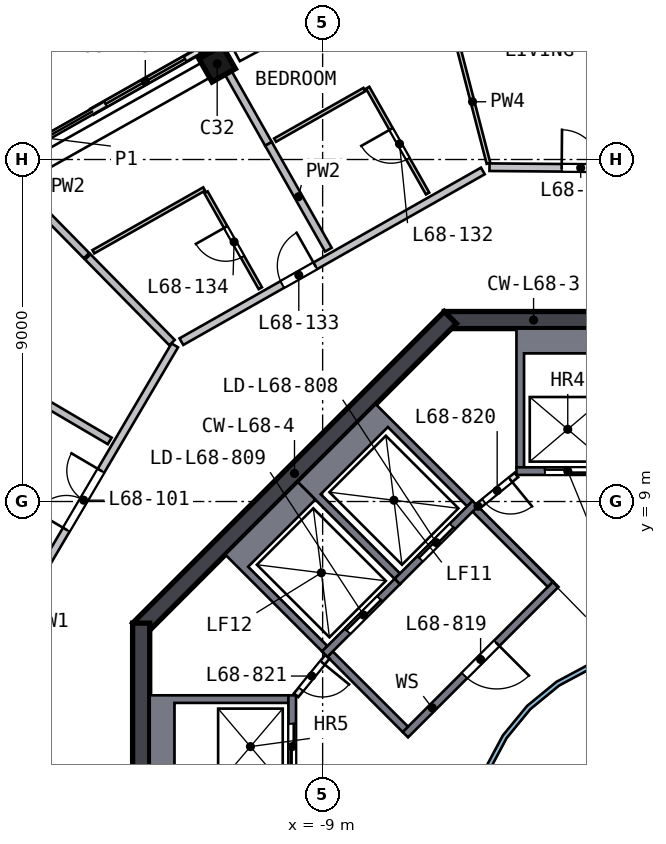
"""IFC4 building model, lengths in metres.
Left out: names, types, materials, properties, quantities, classifications, styles, units other than length and angle.
Written with IfcOpenShell. Run it as: python <this file> out.ifc"""

import sys

from ifc_helpers import new_model, si_unit, direction, frame, frame_2d, origin, origin_2d, place, context, subcontext, project, spatial, polyline, rectangle, outline, extrude, element, fill, save


model = new_model("IFC4")
c1 = context("Model", 3, precision=1e-05, world=origin(), true_north=direction((0.0, 1.0)))
c2 = subcontext(c1, "Body", "Model", "MODEL_VIEW")
j1 = project(units=[si_unit("LENGTHUNIT", "METRE"), si_unit("PLANEANGLEUNIT", "RADIAN")], contexts=[c1])
p1 = place(None, origin())
s1 = spatial("IfcSite", under=j1, at=p1, CompositionType="ELEMENT")
p2 = place(p1, origin())
s2 = spatial("IfcBuilding", under=s1, at=p2, CompositionType="ELEMENT")
p3 = place(p2, frame((0.0, 0.0, 277.5)))
s3 = spatial("IfcBuildingStorey", under=s2, at=p3, CompositionType="ELEMENT", Elevation=277.5)
p4 = place(p3, frame((-11.657, 20.587, 0.0), z_axis=(-0.097493601, -0.056275557, 0.993643829), x_axis=(-0.864752693, -0.4894198, -0.112565713)))
e1 = element("IfcColumn", 1, at=p4, inside=s3, PredefinedType="COLUMN", context=c2, shape_type="SweptSolid", body=[
    extrude(rectangle(XDim=0.7, YDim=0.7, at=origin_2d()), origin(), (0.0, 0.0, 1.0), 3.21),
])
p5 = place(p3, frame((5.799, 13.775, 0.0), z_axis=(0.0, 0.0, 1.0), x_axis=(-1.0, 0.0, 0.0)))
e2 = element("IfcWall", 2, at=p5, inside=s3, PredefinedType="SHEAR", context=c2, shape_type="SweptSolid", body=[
    extrude(rectangle(XDim=11.598, YDim=0.45, at=frame_2d((5.799, 0.0))), origin(), (0.0, 0.0, 1.0), 3.5),
])
p6 = place(p5, frame((4.899, 0.0, 0.0)))
e3 = element("IfcOpeningElement", 3, at=p6, cuts=e2, PredefinedType="OPENING", context=c2, shape_type="SweptSolid", body=[
    extrude(rectangle(XDim=1.8, YDim=2.1, at=frame_2d((0.9, 1.05))), frame((0.0, 0.235, 0.0), z_axis=(0.0, -1.0, 0.0), x_axis=(1.0, 0.0, 0.0)), (0.0, 0.0, 1.0), 0.47),
])
p7 = place(p3, frame((-5.64, 13.841, 0.0), z_axis=(0.0, 0.0, 1.0), x_axis=(-0.707106781, -0.707106781, 0.0)))
e4 = element("IfcWall", 4, at=p7, inside=s3, PredefinedType="SHEAR", context=c2, shape_type="SweptSolid", body=[
    extrude(rectangle(XDim=11.598, YDim=0.45, at=frame_2d((5.799, 0.0))), origin(), (0.0, 0.0, 1.0), 3.5),
])
p8 = place(p3, frame((-13.775, 5.799, 0.0), z_axis=(0.0, 0.0, 1.0), x_axis=(0.0, -1.0, 0.0)))
e5 = element("IfcWall", 5, at=p8, inside=s3, PredefinedType="SHEAR", context=c2, shape_type="SweptSolid", body=[
    extrude(rectangle(XDim=11.598, YDim=0.45, at=frame_2d((5.799, 0.0))), origin(), (0.0, 0.0, 1.0), 3.5),
])
p9 = place(p8, frame((4.899, 0.0, 0.0)))
e6 = element("IfcOpeningElement", 6, at=p9, cuts=e5, PredefinedType="OPENING", context=c2, shape_type="SweptSolid", body=[
    extrude(rectangle(XDim=1.8, YDim=2.1, at=frame_2d((0.9, 1.05))), frame((0.0, 0.235, 0.0), z_axis=(0.0, -1.0, 0.0), x_axis=(1.0, 0.0, 0.0)), (0.0, 0.0, 1.0), 0.47),
])
p10 = place(p3, frame((-11.916, 21.044, 0.0), z_axis=(0.0, 0.0, 1.0), x_axis=(-0.870199981, -0.492698684, 0.0)))
e7 = element("IfcWall", 7, at=p10, inside=s3, PredefinedType="SOLIDWALL", context=c2, shape_type="SweptSolid", body=[
    extrude(rectangle(XDim=3.611, YDim=0.15, at=frame_2d((1.806, 0.0))), origin(), (0.0, 0.0, 1.0), 2.525),
])
p11 = place(p10, frame((0.811, 0.0, 0.0)))
e8 = element("IfcOpeningElement", 8, at=p11, cuts=e7, PredefinedType="OPENING", context=c2, shape_type="SweptSolid", body=[
    extrude(rectangle(XDim=2.4, YDim=2.4, at=frame_2d((1.2, 1.2))), frame((0.0, 0.085, 0.0), z_axis=(0.0, -1.0, 0.0), x_axis=(1.0, 0.0, 0.0)), (0.0, 0.0, 1.0), 0.17),
])
p12 = place(p3, origin())
e9 = element("IfcWall", 9, at=p12, inside=s3, PredefinedType="SOLIDWALL", context=c2, shape_type="SweptSolid", body=[
    extrude(outline(polyline([(-3.9, 13.55), (-1.2, 13.55), (-1.2, 9.9), (-1.4, 9.9), (-1.4, 12.9), (-3.7, 12.9), (-3.7, 9.9), (-3.9, 9.9), (-3.9, 13.55)])), origin(), (0.0, 0.0, 1.0), 3.19),
])
p13 = place(p3, frame((-1.2, 9.8, 0.0), z_axis=(0.0, 0.0, 1.0), x_axis=(-1.0, 0.0, 0.0)))
e10 = element("IfcWall", 10, at=p13, inside=s3, PredefinedType="SOLIDWALL", context=c2, shape_type="SweptSolid", body=[
    extrude(rectangle(XDim=2.7, YDim=0.2, at=frame_2d((1.35, 0.0))), origin(), (0.0, 0.0, 1.0), 3.19),
])
p14 = place(p13, frame((0.75, 0.0, 0.0)))
e11 = element("IfcOpeningElement", 11, at=p14, cuts=e10, PredefinedType="OPENING", context=c2, shape_type="SweptSolid", body=[
    extrude(rectangle(XDim=1.2, YDim=2.1, at=frame_2d((0.6, 1.05))), frame((0.0, 0.11, 0.0), z_axis=(0.0, -1.0, 0.0), x_axis=(1.0, 0.0, 0.0)), (0.0, 0.0, 1.0), 0.22),
])
p15 = place(p3, origin())
e12 = element("IfcWall", 12, at=p15, inside=s3, PredefinedType="SOLIDWALL", context=c2, shape_type="SweptSolid", body=[
    extrude(outline(polyline([(-13.55, 3.9), (-9.9, 3.9), (-9.9, 3.7), (-12.9, 3.7), (-12.9, 1.4), (-9.9, 1.4), (-9.9, 1.2), (-13.55, 1.2), (-13.55, 3.9)])), origin(), (0.0, 0.0, 1.0), 3.19),
])
p16 = place(p3, frame((-9.8, 1.2, 0.0), z_axis=(0.0, 0.0, 1.0), x_axis=(0.0, 1.0, 0.0)))
e13 = element("IfcWall", 13, at=p16, inside=s3, PredefinedType="SOLIDWALL", context=c2, shape_type="SweptSolid", body=[
    extrude(rectangle(XDim=2.7, YDim=0.2, at=frame_2d((1.35, 0.0))), origin(), (0.0, 0.0, 1.0), 3.19),
])
p17 = place(p16, frame((0.75, 0.0, 0.0)))
e14 = element("IfcOpeningElement", 14, at=p17, cuts=e13, PredefinedType="OPENING", context=c2, shape_type="SweptSolid", body=[
    extrude(rectangle(XDim=1.2, YDim=2.1, at=frame_2d((0.6, 1.05))), frame((0.0, 0.11, 0.0), z_axis=(0.0, -1.0, 0.0), x_axis=(1.0, 0.0, 0.0)), (0.0, 0.0, 1.0), 0.22),
])
p18 = place(p3, origin())
e15 = element("IfcWall", 15, at=p18, inside=s3, PredefinedType="SOLIDWALL", context=c2, shape_type="SweptSolid", body=[
    extrude(outline(polyline([(-9.652, 9.51), (-7.601, 11.561), (-5.056, 9.016), (-5.197, 8.874), (-7.283, 10.96), (-9.051, 9.192), (-6.965, 7.106), (-7.106, 6.965), (-9.652, 9.51)])), origin(), (0.0, 0.0, 1.0), 3.19),
])
p19 = place(p3, frame((-4.985, 8.945, 0.0), z_axis=(0.0, 0.0, 1.0), x_axis=(-0.707106781, -0.707106781, 0.0)))
e16 = element("IfcWall", 16, at=p19, inside=s3, PredefinedType="SOLIDWALL", context=c2, shape_type="SweptSolid", body=[
    extrude(rectangle(XDim=2.9, YDim=0.2, at=frame_2d((1.45, 0.0))), origin(), (0.0, 0.0, 1.0), 3.19),
])
p20 = place(p19, frame((0.85, 0.0, 0.0)))
e17 = element("IfcOpeningElement", 17, at=p20, cuts=e16, PredefinedType="OPENING", context=c2, shape_type="SweptSolid", body=[
    extrude(rectangle(XDim=1.2, YDim=2.1, at=frame_2d((0.6, 1.05))), frame((0.0, 0.11, 0.0), z_axis=(0.0, -1.0, 0.0), x_axis=(1.0, 0.0, 0.0)), (0.0, 0.0, 1.0), 0.22),
])
p21 = place(p3, origin())
e18 = element("IfcWall", 18, at=p21, inside=s3, PredefinedType="SOLIDWALL", context=c2, shape_type="SweptSolid", body=[
    extrude(outline(polyline([(-11.561, 7.601), (-9.652, 9.51), (-9.192, 9.051), (-10.96, 7.283), (-8.874, 5.197), (-9.016, 5.056), (-11.561, 7.601)])), origin(), (0.0, 0.0, 1.0), 3.19),
])
p22 = place(p3, frame((-7.036, 6.894, 0.0), z_axis=(0.0, 0.0, 1.0), x_axis=(-0.707106781, -0.707106781, 0.0)))
e19 = element("IfcWall", 19, at=p22, inside=s3, PredefinedType="SOLIDWALL", context=c2, shape_type="SweptSolid", body=[
    extrude(rectangle(XDim=2.7, YDim=0.2, at=frame_2d((1.35, 0.0))), origin(), (0.0, 0.0, 1.0), 3.19),
])
p23 = place(p22, frame((0.65, 0.0, 0.0)))
e20 = element("IfcOpeningElement", 20, at=p23, cuts=e19, PredefinedType="OPENING", context=c2, shape_type="SweptSolid", body=[
    extrude(rectangle(XDim=1.2, YDim=2.1, at=frame_2d((0.6, 1.05))), frame((0.0, 0.11, 0.0), z_axis=(0.0, -1.0, 0.0), x_axis=(1.0, 0.0, 0.0)), (0.0, 0.0, 1.0), 0.22),
])
p24 = place(p3, frame((-2.864, 6.823, 0.0), z_axis=(0.0, 0.0, 1.0), x_axis=(-0.707106781, -0.707106781, 0.0)))
e21 = element("IfcWall", 21, at=p24, inside=s3, PredefinedType="SOLIDWALL", context=c2, shape_type="SweptSolid", body=[
    extrude(rectangle(XDim=5.6, YDim=0.2, at=frame_2d((2.8, 0.0))), origin(), (0.0, 0.0, 1.0), 3.19),
])
p25 = place(p24, frame((2.2, 0.0, 0.0)))
e22 = element("IfcOpeningElement", 22, at=p25, cuts=e21, PredefinedType="OPENING", context=c2, shape_type="SweptSolid", body=[
    extrude(rectangle(XDim=1.2, YDim=2.1, at=frame_2d((0.6, 1.05))), frame((0.0, 0.11, 0.0), z_axis=(0.0, -1.0, 0.0), x_axis=(1.0, 0.0, 0.0)), (0.0, 0.0, 1.0), 0.22),
])
for number, where, z_axis, x_axis in (
    (23, (-3.005, 6.823, 0.0), (0.0, 0.0, 1.0), (-0.707, 0.707, 0.0)),
    (24, (-6.823, 3.005, 0.0), (0.0, 0.0, 1.0), (-0.707, 0.707, 0.0)),
):
    element("IfcWall", number, at=place(p3, frame(where, z_axis=z_axis, x_axis=x_axis)), inside=s3, PredefinedType="SOLIDWALL", context=c2, shape_type="SweptSolid", body=[
        extrude(rectangle(XDim=2.8, YDim=0.2, at=frame_2d((1.4, 0.0))), origin(), (0.0, 0.0, 1.0), 3.19),
    ])
p26 = place(p3, frame((-3.9, 9.7, 0.0), z_axis=(0.0, 0.0, 1.0), x_axis=(-0.775559878, -0.631274009, 0.0)))
e25 = element("IfcWall", 25, at=p26, inside=s3, PredefinedType="PARTITIONING", context=c2, shape_type="SweptSolid", body=[
    extrude(rectangle(XDim=1.308, YDim=0.15, at=frame_2d((0.654, 0.0))), origin(), (0.0, 0.0, 1.0), 3.19),
])
p27 = place(p26, frame((0.204, 0.0, 0.0)))
e26 = element("IfcOpeningElement", 26, at=p27, cuts=e25, PredefinedType="OPENING", context=c2, shape_type="SweptSolid", body=[
    extrude(rectangle(XDim=0.9, YDim=2.1, at=frame_2d((0.45, 1.05))), frame((0.0, 0.085, 0.0), z_axis=(0.0, -1.0, 0.0), x_axis=(1.0, 0.0, 0.0)), (0.0, 0.0, 1.0), 0.17),
])
p28 = place(p3, frame((-8.874, 4.914, 0.0), z_axis=(0.0, 0.0, 1.0), x_axis=(-0.631274009, -0.775559878, 0.0)))
e27 = element("IfcWall", 27, at=p28, inside=s3, PredefinedType="PARTITIONING", context=c2, shape_type="SweptSolid", body=[
    extrude(rectangle(XDim=1.308, YDim=0.15, at=frame_2d((0.654, 0.0))), origin(), (0.0, 0.0, 1.0), 3.19),
])
p29 = place(p28, frame((0.204, 0.0, 0.0)))
e28 = element("IfcOpeningElement", 28, at=p29, cuts=e27, PredefinedType="OPENING", context=c2, shape_type="SweptSolid", body=[
    extrude(rectangle(XDim=0.9, YDim=2.1, at=frame_2d((0.45, 1.05))), frame((0.0, 0.085, 0.0), z_axis=(0.0, -1.0, 0.0), x_axis=(1.0, 0.0, 0.0)), (0.0, 0.0, 1.0), 0.17),
])
p30 = place(p3, origin())
e29 = element("IfcWall", 29, at=p30, inside=s3, PredefinedType="SOLIDWALL", context=c2, shape_type="SweptSolid", body=[
    extrude(outline(polyline([(5.021, -0.999), (4.73, -1.959), (4.257, -2.844), (3.62, -3.62), (2.844, -4.257), (1.959, -4.73), (0.999, -5.021), (0.0, -5.12), (-0.999, -5.021), (-1.959, -4.73), (-2.844, -4.257), (-3.62, -3.62), (-4.257, -2.844), (-4.73, -1.959), (-5.021, -0.999), (-5.12, 0.0), (-5.021, 0.999), (-4.73, 1.959), (-4.257, 2.844), (-3.62, 3.62), (-2.844, 4.257), (-1.959, 4.73), (-0.999, 5.021), (0.0, 5.12), (0.999, 5.021), (1.959, 4.73), (2.844, 4.257), (3.62, 3.62), (4.257, 2.844), (4.73, 1.959), (5.021, 0.999), (5.12, 0.0), (5.021, -0.999)]), holes=[polyline([(4.904, 0.976), (4.619, 1.913), (4.157, 2.778), (3.535, 3.535), (2.778, 4.157), (1.913, 4.619), (0.976, 4.904), (0.0, 5.0), (-0.976, 4.904), (-1.913, 4.619), (-2.778, 4.157), (-3.535, 3.535), (-4.157, 2.778), (-4.619, 1.913), (-4.904, 0.976), (-5.0, 0.0), (-4.904, -0.976), (-4.619, -1.913), (-4.157, -2.778), (-3.535, -3.535), (-2.778, -4.157), (-1.913, -4.619), (-0.976, -4.904), (0.0, -5.0), (0.976, -4.904), (1.913, -4.619), (2.778, -4.157), (3.535, -3.535), (4.157, -2.778), (4.619, -1.913), (4.904, -0.976), (5.0, 0.0), (4.904, 0.976)])]), origin(), (0.0, 0.0, 1.0), 3.19),
])
p31 = place(p3, frame((-17.728, 4.89, 0.0), z_axis=(0.0, 0.0, 1.0), x_axis=(0.507241627, 0.861803883, 0.0)))
e30 = element("IfcWall", 30, at=p31, inside=s3, PredefinedType="SOLIDWALL", context=c2, shape_type="SweptSolid", body=[
    extrude(rectangle(XDim=9.537, YDim=0.2, at=frame_2d((4.768, 0.0))), origin(), (0.0, 0.0, 1.0), 3.19),
])
p32 = place(p31, frame((3.91, 0.0, 0.0)))
e31 = element("IfcOpeningElement", 31, at=p32, cuts=e30, PredefinedType="OPENING", context=c2, shape_type="SweptSolid", body=[
    extrude(rectangle(XDim=1.8, YDim=2.1, at=frame_2d((0.9, 1.05))), frame((0.0, 0.11, 0.0), z_axis=(0.0, -1.0, 0.0), x_axis=(1.0, 0.0, 0.0)), (0.0, 0.0, 1.0), 0.22),
])
p33 = place(p3, frame((-12.717, 13.207, 0.0), z_axis=(0.0, 0.0, 1.0), x_axis=(0.870186015, 0.492723349, 0.0)))
e32 = element("IfcWall", 32, at=p33, inside=s3, PredefinedType="SOLIDWALL", context=c2, shape_type="SweptSolid", body=[
    extrude(rectangle(XDim=9.116, YDim=0.2, at=frame_2d((4.558, 0.0))), origin(), (0.0, 0.0, 1.0), 3.19),
])
p34 = place(p33, frame((3.05, 0.0, 0.0)))
e33 = element("IfcOpeningElement", 33, at=p34, cuts=e32, PredefinedType="OPENING", context=c2, shape_type="SweptSolid", body=[
    extrude(rectangle(XDim=1.0, YDim=2.1, at=frame_2d((0.5, 1.05))), frame((0.0, 0.11, 0.0), z_axis=(0.0, -1.0, 0.0), x_axis=(1.0, 0.0, 0.0)), (0.0, 0.0, 1.0), 0.22),
])
p35 = place(p3, frame((-4.609, 17.798, 0.0), z_axis=(0.0, 0.0, 1.0), x_axis=(0.999964836, -0.008386109, 0.0)))
e34 = element("IfcWall", 34, at=p35, inside=s3, PredefinedType="SOLIDWALL", context=c2, shape_type="SweptSolid", body=[
    extrude(rectangle(XDim=9.316, YDim=0.2, at=frame_2d((4.658, 0.0))), origin(), (0.0, 0.0, 1.0), 3.19),
])
p36 = place(p35, frame((1.9, 0.0, 0.0)))
e35 = element("IfcOpeningElement", 35, at=p36, cuts=e34, PredefinedType="OPENING", context=c2, shape_type="SweptSolid", body=[
    extrude(rectangle(XDim=1.0, YDim=2.1, at=frame_2d((0.5, 1.05))), frame((0.0, 0.11, 0.0), z_axis=(0.0, -1.0, 0.0), x_axis=(1.0, 0.0, 0.0)), (0.0, 0.0, 1.0), 0.22),
])
p37 = place(p3, frame((-23.481, 15.82, 0.0), z_axis=(0.0, 0.0, 1.0), x_axis=(0.861807473, -0.507235526, 0.0)))
e36 = element("IfcWall", 36, at=p37, inside=s3, PredefinedType="SOLIDWALL", context=c2, shape_type="SweptSolid", body=[
    extrude(rectangle(XDim=10.302, YDim=0.2, at=frame_2d((5.151, 0.0))), origin(), (0.0, 0.0, 1.0), 3.19),
])
p38 = place(p37, frame((2.5, 0.0, 0.0)))
e37 = element("IfcOpeningElement", 37, at=p38, cuts=e36, PredefinedType="OPENING", context=c2, shape_type="SweptSolid", body=[
    extrude(rectangle(XDim=1.0, YDim=2.1, at=frame_2d((0.5, 1.05))), frame((0.0, 0.11, 0.0), z_axis=(0.0, -1.0, 0.0), x_axis=(1.0, 0.0, 0.0)), (0.0, 0.0, 1.0), 0.22),
])
p39 = place(p3, frame((-17.504, 17.8, 0.0), z_axis=(0.0, 0.0, 1.0), x_axis=(0.70118172, -0.712982605, 0.0)))
e38 = element("IfcWall", 38, at=p39, inside=s3, PredefinedType="SOLIDWALL", context=c2, shape_type="SweptSolid", body=[
    extrude(rectangle(XDim=3.269, YDim=0.2, at=frame_2d((1.634, 0.0))), origin(), (0.0, 0.0, 1.0), 3.19),
])
p40 = place(p3, frame((-15.18, 15.436, 0.0), z_axis=(0.0, 0.0, 1.0), x_axis=(0.70117398, -0.712990217, 0.0)))
e39 = element("IfcWall", 39, at=p40, inside=s3, PredefinedType="SOLIDWALL", context=c2, shape_type="SweptSolid", body=[
    extrude(rectangle(XDim=3.161, YDim=0.2, at=frame_2d((1.581, 0.0))), origin(), (0.0, 0.0, 1.0), 3.19),
])
p41 = place(p3, frame((-10.425, 18.412, 0.0), z_axis=(0.0, 0.0, 1.0), x_axis=(-0.49273066, 0.870181876, 0.0)))
e40 = element("IfcWall", 40, at=p41, inside=s3, PredefinedType="SOLIDWALL", context=c2, shape_type="SweptSolid", body=[
    extrude(rectangle(XDim=2.95, YDim=0.2, at=frame_2d((1.475, 0.0))), origin(), (0.0, 0.0, 1.0), 3.19),
])
p42 = place(p3, frame((-8.849, 15.627, 0.0), z_axis=(0.0, 0.0, 1.0), x_axis=(-0.492700695, 0.870198842, 0.0)))
e41 = element("IfcWall", 41, at=p42, inside=s3, PredefinedType="SOLIDWALL", context=c2, shape_type="SweptSolid", body=[
    extrude(rectangle(XDim=3.2, YDim=0.2, at=frame_2d((1.6, 0.0))), origin(), (0.0, 0.0, 1.0), 3.19),
])
p43 = place(p3, frame((-15.033, 15.573, 0.0), z_axis=(0.0, 0.0, 1.0), x_axis=(0.87016489, 0.492760656, 0.0)))
e42 = element("IfcWall", 42, at=p43, inside=s3, PredefinedType="PARTITIONING", context=c2, shape_type="SweptSolid", body=[
    extrude(rectangle(XDim=3.35, YDim=0.1, at=frame_2d((1.675, 0.0))), origin(), (0.0, 0.0, 1.0), 3.19),
])
p44 = place(p3, frame((-10.64, 14.613, 0.0), z_axis=(0.0, 0.0, 1.0), x_axis=(-0.492717305, 0.870189438, 0.0)))
e43 = element("IfcWall", 43, at=p44, inside=s3, PredefinedType="PARTITIONING", context=c2, shape_type="SweptSolid", body=[
    extrude(rectangle(XDim=2.9, YDim=0.1, at=frame_2d((1.45, 0.0))), origin(), (0.0, 0.0, 1.0), 3.19),
])
p45 = place(p44, frame((0.95, 0.0, 0.0)))
e44 = element("IfcOpeningElement", 44, at=p45, cuts=e43, PredefinedType="OPENING", context=c2, shape_type="SweptSolid", body=[
    extrude(rectangle(XDim=0.9, YDim=2.1, at=frame_2d((0.45, 1.05))), frame((0.0, 0.06, 0.0), z_axis=(0.0, -1.0, 0.0), x_axis=(1.0, 0.0, 0.0)), (0.0, 0.0, 1.0), 0.12),
])
p46 = place(p3, frame((-7.902, 19.841, 0.0), z_axis=(0.0, 0.0, 1.0), x_axis=(-0.870178583, -0.492736475, 0.0)))
e45 = element("IfcWall", 45, at=p46, inside=s3, PredefinedType="PARTITIONING", context=c2, shape_type="SweptSolid", body=[
    extrude(rectangle(XDim=2.7, YDim=0.1, at=frame_2d((1.35, 0.0))), origin(), (0.0, 0.0, 1.0), 3.19),
])
p47 = place(p3, frame((-6.238, 17.105, 0.0), z_axis=(0.0, 0.0, 1.0), x_axis=(-0.492700695, 0.870198842, 0.0)))
e46 = element("IfcWall", 46, at=p47, inside=s3, PredefinedType="PARTITIONING", context=c2, shape_type="SweptSolid", body=[
    extrude(rectangle(XDim=3.2, YDim=0.1, at=frame_2d((1.6, 0.0))), origin(), (0.0, 0.0, 1.0), 3.19),
])
p48 = place(p47, frame((1.05, 0.0, 0.0)))
e47 = element("IfcOpeningElement", 47, at=p48, cuts=e46, PredefinedType="OPENING", context=c2, shape_type="SweptSolid", body=[
    extrude(rectangle(XDim=0.9, YDim=2.1, at=frame_2d((0.45, 1.05))), frame((0.0, 0.06, 0.0), z_axis=(0.0, -1.0, 0.0), x_axis=(1.0, 0.0, 0.0)), (0.0, 0.0, 1.0), 0.12),
])
p49 = place(p3, frame((-4.635, 17.898, 0.0), z_axis=(0.0, 0.0, 1.0), x_axis=(-0.250705712, 0.968063348, 0.0)))
e48 = element("IfcWall", 48, at=p49, inside=s3, PredefinedType="PARTITIONING", context=c2, shape_type="SweptSolid", body=[
    extrude(rectangle(XDim=6.476, YDim=0.1, at=frame_2d((3.238, 0.0))), origin(), (0.0, 0.0, 1.0), 3.19),
])
p50 = place(p49, frame((3.55, 0.0, 0.0)))
e49 = element("IfcOpeningElement", 49, at=p50, cuts=e48, PredefinedType="OPENING", context=c2, shape_type="SweptSolid", body=[
    extrude(rectangle(XDim=1.0, YDim=2.1, at=frame_2d((0.5, 1.05))), frame((0.0, 0.06, 0.0), z_axis=(0.0, -1.0, 0.0), x_axis=(1.0, 0.0, 0.0)), (0.0, 0.0, 1.0), 0.12),
])
p51 = place(p11, origin())
e50 = element("IfcDoor", 50, at=p51, inside=s3, OperationType="SLIDING_TO_LEFT", PredefinedType="DOOR", context=c2, shape_type="SweptSolid", body=[
    extrude(rectangle(XDim=2.4, YDim=2.4, at=frame_2d((1.2, 1.2))), frame((0.0, 0.025, 0.0), z_axis=(0.0, -1.0, 0.0), x_axis=(1.0, 0.0, 0.0)), (0.0, 0.0, 1.0), 0.05),
])
fill(e8, e50)
p52 = place(p14, origin())
e51 = element("IfcDoor", 51, at=p52, inside=s3, OperationType="DOUBLE_DOOR_SLIDING", PredefinedType="DOOR", context=c2, shape_type="SweptSolid", body=[
    extrude(rectangle(XDim=1.2, YDim=2.1, at=frame_2d((0.6, 1.05))), frame((0.0, 0.025, 0.0), z_axis=(0.0, -1.0, 0.0), x_axis=(1.0, 0.0, 0.0)), (0.0, 0.0, 1.0), 0.05),
])
fill(e11, e51)
p53 = place(p17, origin())
e52 = element("IfcDoor", 52, at=p53, inside=s3, OperationType="DOUBLE_DOOR_SLIDING", PredefinedType="DOOR", context=c2, shape_type="SweptSolid", body=[
    extrude(rectangle(XDim=1.2, YDim=2.1, at=frame_2d((0.6, 1.05))), frame((0.0, 0.025, 0.0), z_axis=(0.0, -1.0, 0.0), x_axis=(1.0, 0.0, 0.0)), (0.0, 0.0, 1.0), 0.05),
])
fill(e14, e52)
p54 = place(p20, origin())
e53 = element("IfcDoor", 53, at=p54, inside=s3, OperationType="DOUBLE_DOOR_SLIDING", PredefinedType="DOOR", context=c2, shape_type="SweptSolid", body=[
    extrude(rectangle(XDim=1.2, YDim=2.1, at=frame_2d((0.6, 1.05))), frame((0.0, 0.025, 0.0), z_axis=(0.0, -1.0, 0.0), x_axis=(1.0, 0.0, 0.0)), (0.0, 0.0, 1.0), 0.05),
])
fill(e17, e53)
p55 = place(p23, origin())
e54 = element("IfcDoor", 54, at=p55, inside=s3, OperationType="DOUBLE_DOOR_SLIDING", PredefinedType="DOOR", context=c2, shape_type="SweptSolid", body=[
    extrude(rectangle(XDim=1.2, YDim=2.1, at=frame_2d((0.6, 1.05))), frame((0.0, 0.025, 0.0), z_axis=(0.0, -1.0, 0.0), x_axis=(1.0, 0.0, 0.0)), (0.0, 0.0, 1.0), 0.05),
])
fill(e20, e54)
p56 = place(p25, origin())
e55 = element("IfcDoor", 55, at=p56, inside=s3, OperationType="SINGLE_SWING_LEFT", PredefinedType="DOOR", context=c2, shape_type="SweptSolid", body=[
    extrude(rectangle(XDim=1.2, YDim=2.1, at=frame_2d((0.6, 1.05))), frame((0.0, 0.025, 0.0), z_axis=(0.0, -1.0, 0.0), x_axis=(1.0, 0.0, 0.0)), (0.0, 0.0, 1.0), 0.05),
])
fill(e22, e55)
p57 = place(p27, origin())
e56 = element("IfcDoor", 56, at=p57, inside=s3, OperationType="SINGLE_SWING_LEFT", PredefinedType="DOOR", context=c2, shape_type="SweptSolid", body=[
    extrude(rectangle(XDim=0.9, YDim=2.1, at=frame_2d((0.45, 1.05))), frame((0.0, 0.025, 0.0), z_axis=(0.0, -1.0, 0.0), x_axis=(1.0, 0.0, 0.0)), (0.0, 0.0, 1.0), 0.05),
])
fill(e26, e56)
p58 = place(p29, origin())
e57 = element("IfcDoor", 57, at=p58, inside=s3, OperationType="SINGLE_SWING_LEFT", PredefinedType="DOOR", context=c2, shape_type="SweptSolid", body=[
    extrude(rectangle(XDim=0.9, YDim=2.1, at=frame_2d((0.45, 1.05))), frame((0.0, 0.025, 0.0), z_axis=(0.0, -1.0, 0.0), x_axis=(1.0, 0.0, 0.0)), (0.0, 0.0, 1.0), 0.05),
])
fill(e28, e57)
p59 = place(p32, origin())
e58 = element("IfcDoor", 58, at=p59, inside=s3, OperationType="DOUBLE_DOOR_SINGLE_SWING", PredefinedType="DOOR", context=c2, shape_type="SweptSolid", body=[
    extrude(rectangle(XDim=1.8, YDim=2.1, at=frame_2d((0.9, 1.05))), frame((0.0, 0.025, 0.0), z_axis=(0.0, -1.0, 0.0), x_axis=(1.0, 0.0, 0.0)), (0.0, 0.0, 1.0), 0.05),
])
fill(e31, e58)
p60 = place(p36, origin())
e59 = element("IfcDoor", 59, at=p60, inside=s3, OperationType="SINGLE_SWING_LEFT", PredefinedType="DOOR", context=c2, shape_type="SweptSolid", body=[
    extrude(rectangle(XDim=1.0, YDim=2.1, at=frame_2d((0.5, 1.05))), frame((0.0, 0.025, 0.0), z_axis=(0.0, -1.0, 0.0), x_axis=(1.0, 0.0, 0.0)), (0.0, 0.0, 1.0), 0.05),
])
fill(e35, e59)
p61 = place(p48, origin())
e60 = element("IfcDoor", 60, at=p61, inside=s3, OperationType="SINGLE_SWING_RIGHT", PredefinedType="DOOR", context=c2, shape_type="SweptSolid", body=[
    extrude(rectangle(XDim=0.9, YDim=2.1, at=frame_2d((0.45, 1.05))), frame((0.0, 0.025, 0.0), z_axis=(0.0, -1.0, 0.0), x_axis=(1.0, 0.0, 0.0)), (0.0, 0.0, 1.0), 0.05),
])
fill(e47, e60)
p62 = place(p34, origin())
e61 = element("IfcDoor", 61, at=p62, inside=s3, OperationType="SINGLE_SWING_RIGHT", PredefinedType="DOOR", context=c2, shape_type="SweptSolid", body=[
    extrude(rectangle(XDim=1.0, YDim=2.1, at=frame_2d((0.5, 1.05))), frame((0.0, 0.025, 0.0), z_axis=(0.0, -1.0, 0.0), x_axis=(1.0, 0.0, 0.0)), (0.0, 0.0, 1.0), 0.05),
])
fill(e33, e61)
p63 = place(p45, origin())
e62 = element("IfcDoor", 62, at=p63, inside=s3, OperationType="SINGLE_SWING_RIGHT", PredefinedType="DOOR", context=c2, shape_type="SweptSolid", body=[
    extrude(rectangle(XDim=0.9, YDim=2.1, at=frame_2d((0.45, 1.05))), frame((0.0, 0.025, 0.0), z_axis=(0.0, -1.0, 0.0), x_axis=(1.0, 0.0, 0.0)), (0.0, 0.0, 1.0), 0.05),
])
fill(e44, e62)
save(model, sys.argv[1])
